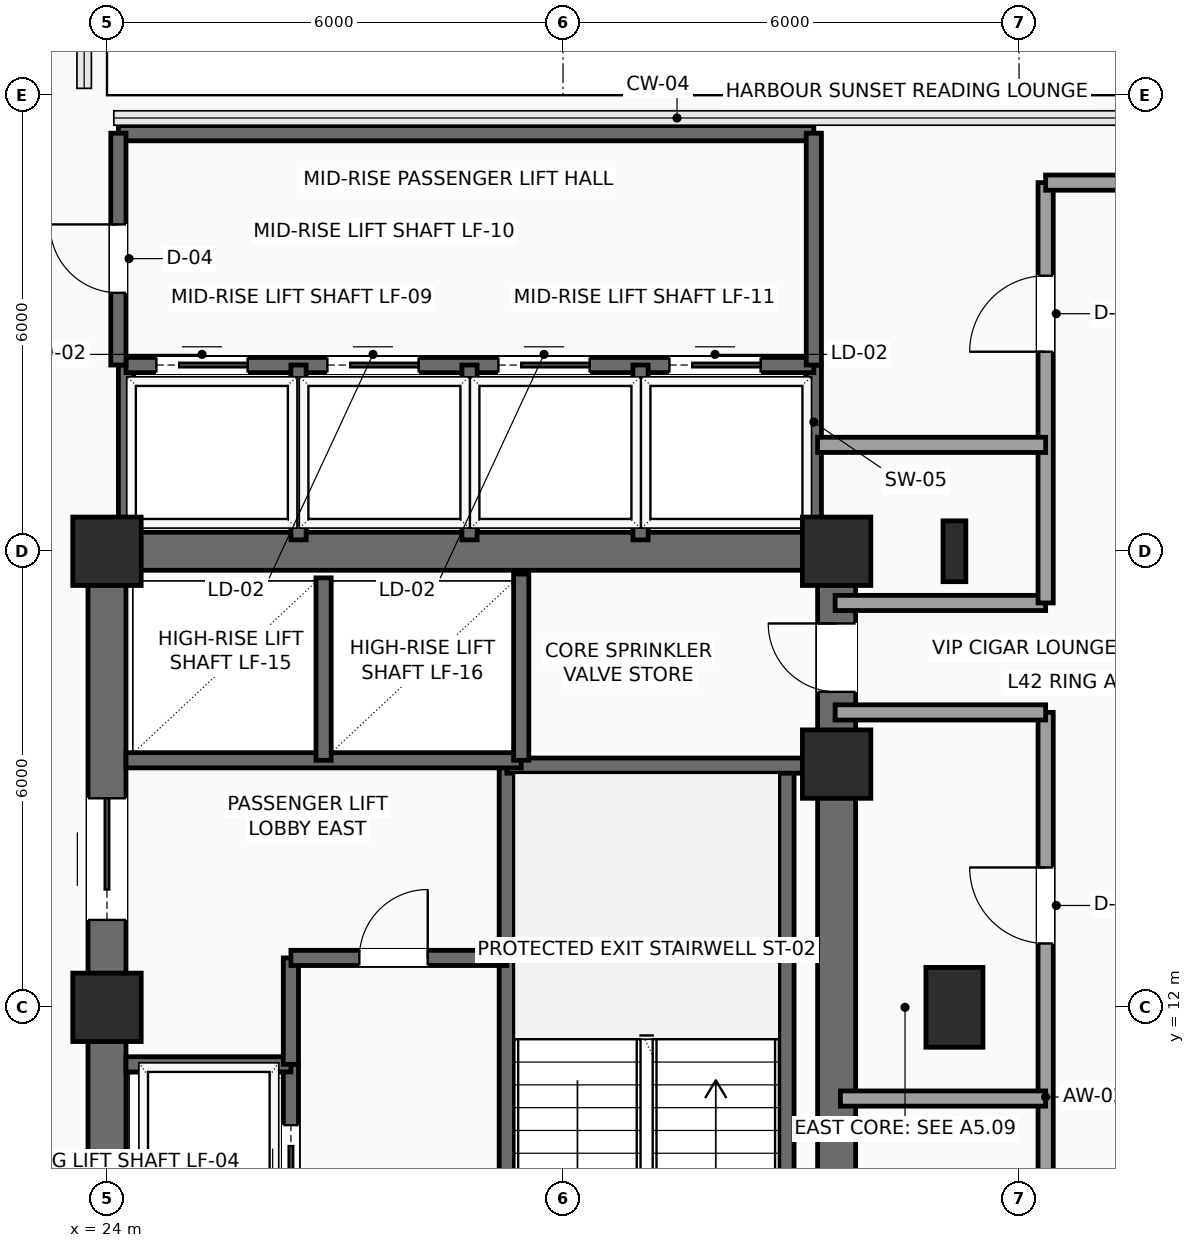
"""IFC4 building model, lengths in metres.
Left out: names, types, materials, properties, quantities, classifications, styles, units other than length and angle.
Written with IfcOpenShell. Run it as: python <this file> out.ifc"""

import sys

from ifc_helpers import new_model, si_unit, direction, frame, frame_2d, origin, origin_2d, place, context, subcontext, project, spatial, rectangle, i_section, extrude, element, fill, save


model = new_model("IFC4")
c1 = context("Model", 3, precision=1e-05, world=origin(), true_north=direction((0.0, 1.0)))
c2 = subcontext(c1, "Body", "Model", "MODEL_VIEW")
j1 = project(units=[si_unit("LENGTHUNIT", "METRE"), si_unit("PLANEANGLEUNIT", "RADIAN")], contexts=[c1])
p1 = place(None, origin())
s1 = spatial("IfcSite", under=j1, at=p1, CompositionType="ELEMENT")
p2 = place(p1, origin())
s2 = spatial("IfcBuilding", under=s1, at=p2, CompositionType="ELEMENT")
p3 = place(p2, frame((0.0, 0.0, 172.95)))
s3 = spatial("IfcBuildingStorey", under=s2, at=p3, CompositionType="ELEMENT", Elevation=172.95)
for number, where, z_axis, x_axis in (
    (1, (24.0, 12.0, 0.0), (0.0, 0.0, 1.0), (1.0, 0.0, 0.0)),
    (2, (24.0, 18.0, 0.0), (0.0, 0.0, 1.0), (1.0, 0.0, 0.0)),
    (3, (33.6, 15.2, 0.0), (0.0, 0.0, 1.0), (1.0, 0.0, 0.0)),
    (4, (33.6, 18.0, 0.0), (0.0, 0.0, 1.0), (1.0, 0.0, 0.0)),
):
    element("IfcColumn", number, at=place(p3, frame(where, z_axis=z_axis, x_axis=x_axis)), inside=s3, PredefinedType="COLUMN", context=c2, shape_type="SweptSolid", body=[
        extrude(rectangle(XDim=0.9, YDim=0.9, at=origin_2d()), origin(), (0.0, 0.0, 1.0), 3.75),
    ])
p4 = place(p3, frame((35.15, 12.0, 0.0), z_axis=(0.0, 0.0, 1.0), x_axis=(1.0, 0.0, 0.0)))
e5 = element("IfcColumn", 5, at=p4, inside=s3, PredefinedType="COLUMN", context=c2, shape_type="SweptSolid", body=[
    extrude(rectangle(XDim=0.75, YDim=1.05, at=origin_2d()), origin(), (0.0, 0.0, 1.0), 3.75),
])
p5 = place(p3, frame((35.15, 18.0, 0.0), z_axis=(0.0, 0.0, 1.0), x_axis=(1.0, 0.0, 0.0)))
e6 = element("IfcColumn", 6, at=p5, inside=s3, PredefinedType="COLUMN", context=c2, shape_type="SweptSolid", body=[
    extrude(i_section(OverallWidth=0.3, OverallDepth=0.8, WebThickness=0.018, FlangeThickness=0.033, FilletRadius=0.03, at=origin_2d()), origin(), (0.0, 0.0, 1.0), 3.75),
])
p6 = place(p3, frame((24.0, 18.0, 0.0), z_axis=(0.0, 0.0, 1.0), x_axis=(1.0, 0.0, 0.0)))
e7 = element("IfcWall", 7, at=p6, inside=s3, PredefinedType="SHEAR", context=c2, shape_type="SweptSolid", body=[
    extrude(rectangle(XDim=9.6, YDim=0.5, at=frame_2d((4.8, 0.0))), origin(), (0.0, 0.0, 1.0), 3.54),
])
p7 = place(p3, frame((24.0, 6.0, 0.0), z_axis=(0.0, 0.0, 1.0), x_axis=(0.0, 1.0, 0.0)))
e8 = element("IfcWall", 8, at=p7, inside=s3, PredefinedType="SHEAR", context=c2, shape_type="SweptSolid", body=[
    extrude(rectangle(XDim=12.0, YDim=0.5, at=frame_2d((6.0, 0.0))), origin(), (0.0, 0.0, 1.0), 3.54),
])
p8 = place(p7, frame((7.15, 0.0, 0.0)))
e9 = element("IfcOpeningElement", 9, at=p8, cuts=e8, PredefinedType="OPENING", context=c2, shape_type="SweptSolid", body=[
    extrude(rectangle(XDim=1.6, YDim=2.3, at=frame_2d((0.8, 1.15))), frame((0.0, 0.26, 0.0), z_axis=(0.0, -1.0, 0.0), x_axis=(1.0, 0.0, 0.0)), (0.0, 0.0, 1.0), 0.52),
])
p9 = place(p3, frame((33.6, 6.0, 0.0), z_axis=(0.0, 0.0, 1.0), x_axis=(0.0, 1.0, 0.0)))
e10 = element("IfcWall", 10, at=p9, inside=s3, PredefinedType="SHEAR", context=c2, shape_type="SweptSolid", body=[
    extrude(rectangle(XDim=12.0, YDim=0.5, at=frame_2d((6.0, 0.0))), origin(), (0.0, 0.0, 1.0), 3.54),
])
p10 = place(p9, frame((10.15, 0.0, 0.0)))
e11 = element("IfcOpeningElement", 11, at=p10, cuts=e10, PredefinedType="OPENING", context=c2, shape_type="SweptSolid", body=[
    extrude(rectangle(XDim=0.9, YDim=2.15, at=frame_2d((0.45, 1.075))), frame((0.0, 0.26, 0.0), z_axis=(0.0, -1.0, 0.0), x_axis=(1.0, 0.0, 0.0)), (0.0, 0.0, 1.0), 0.52),
])
p11 = place(p3, frame((29.26, 6.3, 0.0), z_axis=(0.0, 0.0, 1.0), x_axis=(0.0, 1.0, 0.0)))
e12 = element("IfcWall", 12, at=p11, inside=s3, PredefinedType="SHEAR", context=c2, shape_type="SweptSolid", body=[
    extrude(rectangle(XDim=8.88, YDim=0.2, at=frame_2d((4.44, 0.0))), origin(), (0.0, 0.0, 1.0), 3.54),
])
p12 = place(p11, frame((0.35, 0.0, 0.0)))
e13 = element("IfcOpeningElement", 13, at=p12, cuts=e12, PredefinedType="OPENING", context=c2, shape_type="SweptSolid", body=[
    extrude(rectangle(XDim=1.1, YDim=2.2, at=frame_2d((0.55, 1.1))), frame((0.0, 0.11, 0.0), z_axis=(0.0, -1.0, 0.0), x_axis=(1.0, 0.0, 0.0)), (0.0, 0.0, 1.0), 0.22),
])
p13 = place(p3, frame((32.94, 6.3, 0.0), z_axis=(0.0, 0.0, 1.0), x_axis=(0.0, 1.0, 0.0)))
e14 = element("IfcWall", 14, at=p13, inside=s3, PredefinedType="SHEAR", context=c2, shape_type="SweptSolid", body=[
    extrude(rectangle(XDim=8.88, YDim=0.2, at=frame_2d((4.44, 0.0))), origin(), (0.0, 0.0, 1.0), 3.54),
])
p14 = place(p3, frame((29.26, 15.18, 0.0), z_axis=(0.0, 0.0, 1.0), x_axis=(1.0, 0.0, 0.0)))
e15 = element("IfcWall", 15, at=p14, inside=s3, PredefinedType="SHEAR", context=c2, shape_type="SweptSolid", body=[
    extrude(rectangle(XDim=4.04, YDim=0.2, at=frame_2d((2.02, 0.0))), origin(), (0.0, 0.0, 1.0), 3.54),
])
p15 = place(p3, frame((26.42, 6.3, 0.0), z_axis=(0.0, 0.0, 1.0), x_axis=(0.0, 1.0, 0.0)))
e16 = element("IfcWall", 16, at=p15, inside=s3, PredefinedType="SHEAR", context=c2, shape_type="SweptSolid", body=[
    extrude(rectangle(XDim=4.95, YDim=0.2, at=frame_2d((2.475, 0.0))), origin(), (0.0, 0.0, 1.0), 3.54),
])
p16 = place(p15, frame((0.65, 0.0, 0.0)))
e17 = element("IfcOpeningElement", 17, at=p16, cuts=e16, PredefinedType="OPENING", context=c2, shape_type="SweptSolid", body=[
    extrude(rectangle(XDim=1.1, YDim=2.2, at=frame_2d((0.55, 1.1))), frame((0.0, 0.11, 0.0), z_axis=(0.0, -1.0, 0.0), x_axis=(1.0, 0.0, 0.0)), (0.0, 0.0, 1.0), 0.22),
])
p17 = place(p15, frame((3.05, 0.0, 0.0)))
e18 = element("IfcOpeningElement", 18, at=p17, cuts=e16, PredefinedType="OPENING", context=c2, shape_type="SweptSolid", body=[
    extrude(rectangle(XDim=1.1, YDim=2.2, at=frame_2d((0.55, 1.1))), frame((0.0, 0.11, 0.0), z_axis=(0.0, -1.0, 0.0), x_axis=(1.0, 0.0, 0.0)), (0.0, 0.0, 1.0), 0.22),
])
p18 = place(p3, frame((24.25, 11.25, 0.0), z_axis=(0.0, 0.0, 1.0), x_axis=(1.0, 0.0, 0.0)))
e19 = element("IfcWall", 19, at=p18, inside=s3, PredefinedType="SHEAR", context=c2, shape_type="SweptSolid", body=[
    extrude(rectangle(XDim=2.17, YDim=0.2, at=frame_2d((1.085, 0.0))), origin(), (0.0, 0.0, 1.0), 3.54),
])
p19 = place(p3, frame((26.42, 11.25, 0.0), z_axis=(0.0, 0.0, 1.0), x_axis=(0.0, 1.0, 0.0)))
e20 = element("IfcWall", 20, at=p19, inside=s3, PredefinedType="SHEAR", context=c2, shape_type="SweptSolid", body=[
    extrude(rectangle(XDim=1.4, YDim=0.2, at=frame_2d((0.7, 0.0))), origin(), (0.0, 0.0, 1.0), 3.54),
])
p20 = place(p3, frame((26.42, 12.65, 0.0), z_axis=(0.0, 0.0, 1.0), x_axis=(1.0, 0.0, 0.0)))
e21 = element("IfcWall", 21, at=p20, inside=s3, PredefinedType="SHEAR", context=c2, shape_type="SweptSolid", body=[
    extrude(rectangle(XDim=2.84, YDim=0.2, at=frame_2d((1.42, 0.0))), origin(), (0.0, 0.0, 1.0), 3.54),
])
p21 = place(p20, frame((0.9, 0.0, 0.0)))
e22 = element("IfcOpeningElement", 22, at=p21, cuts=e21, PredefinedType="OPENING", context=c2, shape_type="SweptSolid", body=[
    extrude(rectangle(XDim=0.9, YDim=2.15, at=frame_2d((0.45, 1.075))), frame((0.0, 0.11, 0.0), z_axis=(0.0, -1.0, 0.0), x_axis=(1.0, 0.0, 0.0)), (0.0, 0.0, 1.0), 0.22),
])
p22 = place(p3, frame((24.25, 15.25, 0.0), z_axis=(0.0, 0.0, 1.0), x_axis=(1.0, 0.0, 0.0)))
e23 = element("IfcWall", 23, at=p22, inside=s3, PredefinedType="SHEAR", context=c2, shape_type="SweptSolid", body=[
    extrude(rectangle(XDim=5.2, YDim=0.2, at=frame_2d((2.6, 0.0))), origin(), (0.0, 0.0, 1.0), 3.54),
])
p23 = place(p3, frame((26.85, 15.25, 0.0), z_axis=(0.0, 0.0, 1.0), x_axis=(0.0, 1.0, 0.0)))
e24 = element("IfcWall", 24, at=p23, inside=s3, PredefinedType="SHEAR", context=c2, shape_type="SweptSolid", body=[
    extrude(rectangle(XDim=2.4, YDim=0.2, at=frame_2d((1.2, 0.0))), origin(), (0.0, 0.0, 1.0), 3.54),
])
p24 = place(p3, frame((29.45, 15.25, 0.0), z_axis=(0.0, 0.0, 1.0), x_axis=(0.0, 1.0, 0.0)))
e25 = element("IfcWall", 25, at=p24, inside=s3, PredefinedType="SHEAR", context=c2, shape_type="SweptSolid", body=[
    extrude(rectangle(XDim=2.45, YDim=0.2, at=frame_2d((1.225, 0.0))), origin(), (0.0, 0.0, 1.0), 3.54),
])
for number, where, z_axis, x_axis in (
    (26, (33.3, 18.1, 0.0), (0.0, 0.0, 1.0), (0.0, 1.0, 0.0)),
    (27, (24.25, 18.1, 0.0), (0.0, 0.0, 1.0), (0.0, 1.0, 0.0)),
):
    element("IfcWall", number, at=place(p3, frame(where, z_axis=z_axis, x_axis=x_axis)), inside=s3, PredefinedType="SHEAR", context=c2, shape_type="SweptSolid", body=[
        extrude(rectangle(XDim=2.35, YDim=0.2, at=frame_2d((1.175, 0.0))), origin(), (0.0, 0.0, 1.0), 3.54),
    ])
p25 = place(p3, frame((24.25, 20.45, 0.0), z_axis=(0.0, 0.0, 1.0), x_axis=(1.0, 0.0, 0.0)))
e28 = element("IfcWall", 28, at=p25, inside=s3, PredefinedType="SHEAR", context=c2, shape_type="SweptSolid", body=[
    extrude(rectangle(XDim=9.05, YDim=0.2, at=frame_2d((4.525, 0.0))), origin(), (0.0, 0.0, 1.0), 3.54),
])
p26 = place(p25, frame((0.4, 0.0, 0.0)))
e29 = element("IfcOpeningElement", 29, at=p26, cuts=e28, PredefinedType="OPENING", context=c2, shape_type="SweptSolid", body=[
    extrude(rectangle(XDim=1.2, YDim=2.2, at=frame_2d((0.6, 1.1))), frame((0.0, 0.11, 0.0), z_axis=(0.0, -1.0, 0.0), x_axis=(1.0, 0.0, 0.0)), (0.0, 0.0, 1.0), 0.22),
])
p27 = place(p25, frame((2.65, 0.0, 0.0)))
e30 = element("IfcOpeningElement", 30, at=p27, cuts=e28, PredefinedType="OPENING", context=c2, shape_type="SweptSolid", body=[
    extrude(rectangle(XDim=1.2, YDim=2.2, at=frame_2d((0.6, 1.1))), frame((0.0, 0.11, 0.0), z_axis=(0.0, -1.0, 0.0), x_axis=(1.0, 0.0, 0.0)), (0.0, 0.0, 1.0), 0.22),
])
p28 = place(p25, frame((4.9, 0.0, 0.0)))
e31 = element("IfcOpeningElement", 31, at=p28, cuts=e28, PredefinedType="OPENING", context=c2, shape_type="SweptSolid", body=[
    extrude(rectangle(XDim=1.2, YDim=2.2, at=frame_2d((0.6, 1.1))), frame((0.0, 0.11, 0.0), z_axis=(0.0, -1.0, 0.0), x_axis=(1.0, 0.0, 0.0)), (0.0, 0.0, 1.0), 0.22),
])
p29 = place(p25, frame((7.15, 0.0, 0.0)))
e32 = element("IfcOpeningElement", 32, at=p29, cuts=e28, PredefinedType="OPENING", context=c2, shape_type="SweptSolid", body=[
    extrude(rectangle(XDim=1.2, YDim=2.2, at=frame_2d((0.6, 1.1))), frame((0.0, 0.11, 0.0), z_axis=(0.0, -1.0, 0.0), x_axis=(1.0, 0.0, 0.0)), (0.0, 0.0, 1.0), 0.22),
])
for number, where, z_axis, x_axis in (
    (33, (26.52, 18.15, 0.0), (0.0, 0.0, 1.0), (0.0, 1.0, 0.0)),
    (34, (28.77, 18.15, 0.0), (0.0, 0.0, 1.0), (0.0, 1.0, 0.0)),
    (35, (31.02, 18.15, 0.0), (0.0, 0.0, 1.0), (0.0, 1.0, 0.0)),
):
    element("IfcWall", number, at=place(p3, frame(where, z_axis=z_axis, x_axis=x_axis)), inside=s3, PredefinedType="SHEAR", context=c2, shape_type="SweptSolid", body=[
        extrude(rectangle(XDim=2.3, YDim=0.2, at=frame_2d((1.15, 0.0))), origin(), (0.0, 0.0, 1.0), 3.54),
    ])
p30 = place(p3, frame((24.15, 23.5, 0.0), z_axis=(0.0, 0.0, 1.0), x_axis=(1.0, 0.0, 0.0)))
e36 = element("IfcWall", 36, at=p30, inside=s3, PredefinedType="SHEAR", context=c2, shape_type="SweptSolid", body=[
    extrude(rectangle(XDim=9.15, YDim=0.2, at=frame_2d((4.575, 0.0))), origin(), (0.0, 0.0, 1.0), 3.54),
])
p31 = place(p3, frame((33.3, 20.45, 0.0), z_axis=(0.0, 0.0, 1.0), x_axis=(0.0, 1.0, 0.0)))
e37 = element("IfcWall", 37, at=p31, inside=s3, PredefinedType="SHEAR", context=c2, shape_type="SweptSolid", body=[
    extrude(rectangle(XDim=3.05, YDim=0.2, at=frame_2d((1.525, 0.0))), origin(), (0.0, 0.0, 1.0), 3.54),
])
p32 = place(p3, frame((24.15, 20.45, 0.0), z_axis=(0.0, 0.0, 1.0), x_axis=(0.0, 1.0, 0.0)))
e38 = element("IfcWall", 38, at=p32, inside=s3, PredefinedType="SHEAR", context=c2, shape_type="SweptSolid", body=[
    extrude(rectangle(XDim=3.05, YDim=0.2, at=frame_2d((1.525, 0.0))), origin(), (0.0, 0.0, 1.0), 3.54),
])
p33 = place(p32, frame((0.95, 0.0, 0.0)))
e39 = element("IfcOpeningElement", 39, at=p33, cuts=e38, PredefinedType="OPENING", context=c2, shape_type="SweptSolid", body=[
    extrude(rectangle(XDim=0.9, YDim=2.15, at=frame_2d((0.45, 1.075))), frame((0.0, 0.11, 0.0), z_axis=(0.0, -1.0, 0.0), x_axis=(1.0, 0.0, 0.0)), (0.0, 0.0, 1.0), 0.22),
])
p34 = place(p3, frame((36.35, 5.8, 0.0), z_axis=(0.0, 0.0, 1.0), x_axis=(0.0, 1.0, 0.0)))
e40 = element("IfcWall", 40, at=p34, inside=s3, PredefinedType="PARTITIONING", context=c2, shape_type="SweptSolid", body=[
    extrude(rectangle(XDim=10.08, YDim=0.2, at=frame_2d((5.04, 0.0))), origin(), (0.0, 0.0, 1.0), 3.54),
])
p35 = place(p34, frame((2.0, 0.0, 0.0)))
e41 = element("IfcOpeningElement", 41, at=p35, cuts=e40, PredefinedType="OPENING", context=c2, shape_type="SweptSolid", body=[
    extrude(rectangle(XDim=1.0, YDim=2.2, at=frame_2d((0.5, 1.1))), frame((0.0, 0.11, 0.0), z_axis=(0.0, -1.0, 0.0), x_axis=(1.0, 0.0, 0.0)), (0.0, 0.0, 1.0), 0.22),
])
p36 = place(p34, frame((7.04, 0.0, 0.0)))
e42 = element("IfcOpeningElement", 42, at=p36, cuts=e40, PredefinedType="OPENING", context=c2, shape_type="SweptSolid", body=[
    extrude(rectangle(XDim=1.0, YDim=2.2, at=frame_2d((0.5, 1.1))), frame((0.0, 0.11, 0.0), z_axis=(0.0, -1.0, 0.0), x_axis=(1.0, 0.0, 0.0)), (0.0, 0.0, 1.0), 0.22),
])
for number, where, z_axis, x_axis in (
    (43, (36.35, 15.88, 0.0), (0.0, 0.0, 1.0), (-1.0, 0.0, 0.0)),
    (44, (33.58, 17.32, 0.0), (0.0, 0.0, 1.0), (1.0, 0.0, 0.0)),
):
    element("IfcWall", number, at=place(p3, frame(where, z_axis=z_axis, x_axis=x_axis)), inside=s3, PredefinedType="PARTITIONING", context=c2, shape_type="SweptSolid", body=[
        extrude(rectangle(XDim=2.77, YDim=0.2, at=frame_2d((1.385, 0.0))), origin(), (0.0, 0.0, 1.0), 3.54),
    ])
p37 = place(p3, frame((36.35, 17.32, 0.0), z_axis=(0.0, 0.0, 1.0), x_axis=(0.0, 1.0, 0.0)))
e45 = element("IfcWall", 45, at=p37, inside=s3, PredefinedType="PARTITIONING", context=c2, shape_type="SweptSolid", body=[
    extrude(rectangle(XDim=5.53, YDim=0.2, at=frame_2d((2.765, 0.0))), origin(), (0.0, 0.0, 1.0), 3.54),
])
p38 = place(p37, frame((3.305, 0.0, 0.0)))
e46 = element("IfcOpeningElement", 46, at=p38, cuts=e45, PredefinedType="OPENING", context=c2, shape_type="SweptSolid", body=[
    extrude(rectangle(XDim=1.0, YDim=2.2, at=frame_2d((0.5, 1.1))), frame((0.0, 0.11, 0.0), z_axis=(0.0, -1.0, 0.0), x_axis=(1.0, 0.0, 0.0)), (0.0, 0.0, 1.0), 0.22),
])
p39 = place(p3, frame((36.35, 22.85, 0.0), z_axis=(0.0, 0.0, 1.0), x_axis=(1.0, 0.0, 0.0)))
e47 = element("IfcWall", 47, at=p39, inside=s3, PredefinedType="PARTITIONING", context=c2, shape_type="SweptSolid", body=[
    extrude(rectangle(XDim=2.1, YDim=0.2, at=frame_2d((1.05, 0.0))), origin(), (0.0, 0.0, 1.0), 3.54),
])
p40 = place(p3, frame((33.65, 10.8, 0.0), z_axis=(0.0, 0.0, 1.0), x_axis=(1.0, 0.0, 0.0)))
e48 = element("IfcWall", 48, at=p40, inside=s3, PredefinedType="PARTITIONING", context=c2, shape_type="SweptSolid", body=[
    extrude(rectangle(XDim=2.7, YDim=0.2, at=frame_2d((1.35, 0.0))), origin(), (0.0, 0.0, 1.0), 3.54),
])
p41 = place(p3, frame((33.35, 19.4, 0.0), z_axis=(0.0, 0.0, 1.0), x_axis=(1.0, 0.0, 0.0)))
e49 = element("IfcWall", 49, at=p41, inside=s3, PredefinedType="PARTITIONING", context=c2, shape_type="SweptSolid", body=[
    extrude(rectangle(XDim=3.0, YDim=0.2, at=frame_2d((1.5, 0.0))), origin(), (0.0, 0.0, 1.0), 3.54),
])
p42 = place(p8, origin())
e50 = element("IfcDoor", 50, at=p42, inside=s3, OperationType="DOUBLE_DOOR_SLIDING", PredefinedType="DOOR", context=c2, shape_type="SweptSolid", body=[
    extrude(rectangle(XDim=1.6, YDim=2.3, at=frame_2d((0.8, 1.15))), frame((0.0, 0.025, 0.0), z_axis=(0.0, -1.0, 0.0), x_axis=(1.0, 0.0, 0.0)), (0.0, 0.0, 1.0), 0.05),
])
fill(e9, e50)
p43 = place(p10, origin())
e51 = element("IfcDoor", 51, at=p43, inside=s3, OperationType="SINGLE_SWING_RIGHT", PredefinedType="DOOR", context=c2, shape_type="SweptSolid", body=[
    extrude(rectangle(XDim=0.9, YDim=2.15, at=frame_2d((0.45, 1.075))), frame((0.0, 0.025, 0.0), z_axis=(0.0, -1.0, 0.0), x_axis=(1.0, 0.0, 0.0)), (0.0, 0.0, 1.0), 0.05),
])
fill(e11, e51)
p44 = place(p17, origin())
e52 = element("IfcDoor", 52, at=p44, inside=s3, OperationType="SLIDING_TO_LEFT", PredefinedType="DOOR", context=c2, shape_type="SweptSolid", body=[
    extrude(rectangle(XDim=1.1, YDim=2.2, at=frame_2d((0.55, 1.1))), frame((0.0, 0.025, 0.0), z_axis=(0.0, -1.0, 0.0), x_axis=(1.0, 0.0, 0.0)), (0.0, 0.0, 1.0), 0.05),
])
fill(e18, e52)
p45 = place(p21, origin())
e53 = element("IfcDoor", 53, at=p45, inside=s3, OperationType="SINGLE_SWING_RIGHT", PredefinedType="DOOR", context=c2, shape_type="SweptSolid", body=[
    extrude(rectangle(XDim=0.9, YDim=2.15, at=frame_2d((0.45, 1.075))), frame((0.0, 0.025, 0.0), z_axis=(0.0, -1.0, 0.0), x_axis=(1.0, 0.0, 0.0)), (0.0, 0.0, 1.0), 0.05),
])
fill(e22, e53)
p46 = place(p26, origin())
e54 = element("IfcDoor", 54, at=p46, inside=s3, OperationType="SLIDING_TO_RIGHT", PredefinedType="DOOR", context=c2, shape_type="SweptSolid", body=[
    extrude(rectangle(XDim=1.2, YDim=2.2, at=frame_2d((0.6, 1.1))), frame((0.0, 0.025, 0.0), z_axis=(0.0, -1.0, 0.0), x_axis=(1.0, 0.0, 0.0)), (0.0, 0.0, 1.0), 0.05),
])
fill(e29, e54)
p47 = place(p27, origin())
e55 = element("IfcDoor", 55, at=p47, inside=s3, OperationType="SLIDING_TO_RIGHT", PredefinedType="DOOR", context=c2, shape_type="SweptSolid", body=[
    extrude(rectangle(XDim=1.2, YDim=2.2, at=frame_2d((0.6, 1.1))), frame((0.0, 0.025, 0.0), z_axis=(0.0, -1.0, 0.0), x_axis=(1.0, 0.0, 0.0)), (0.0, 0.0, 1.0), 0.05),
])
fill(e30, e55)
p48 = place(p28, origin())
e56 = element("IfcDoor", 56, at=p48, inside=s3, OperationType="SLIDING_TO_RIGHT", PredefinedType="DOOR", context=c2, shape_type="SweptSolid", body=[
    extrude(rectangle(XDim=1.2, YDim=2.2, at=frame_2d((0.6, 1.1))), frame((0.0, 0.025, 0.0), z_axis=(0.0, -1.0, 0.0), x_axis=(1.0, 0.0, 0.0)), (0.0, 0.0, 1.0), 0.05),
])
fill(e31, e56)
p49 = place(p29, origin())
e57 = element("IfcDoor", 57, at=p49, inside=s3, OperationType="SLIDING_TO_RIGHT", PredefinedType="DOOR", context=c2, shape_type="SweptSolid", body=[
    extrude(rectangle(XDim=1.2, YDim=2.2, at=frame_2d((0.6, 1.1))), frame((0.0, 0.025, 0.0), z_axis=(0.0, -1.0, 0.0), x_axis=(1.0, 0.0, 0.0)), (0.0, 0.0, 1.0), 0.05),
])
fill(e32, e57)
p50 = place(p33, origin())
e58 = element("IfcDoor", 58, at=p50, inside=s3, OperationType="SINGLE_SWING_RIGHT", PredefinedType="DOOR", context=c2, shape_type="SweptSolid", body=[
    extrude(rectangle(XDim=0.9, YDim=2.15, at=frame_2d((0.45, 1.075))), frame((0.0, 0.025, 0.0), z_axis=(0.0, -1.0, 0.0), x_axis=(1.0, 0.0, 0.0)), (0.0, 0.0, 1.0), 0.05),
])
fill(e39, e58)
p51 = place(p36, origin())
e59 = element("IfcDoor", 59, at=p51, inside=s3, OperationType="SINGLE_SWING_RIGHT", PredefinedType="DOOR", context=c2, shape_type="SweptSolid", body=[
    extrude(rectangle(XDim=1.0, YDim=2.2, at=frame_2d((0.5, 1.1))), frame((0.0, 0.025, 0.0), z_axis=(0.0, -1.0, 0.0), x_axis=(1.0, 0.0, 0.0)), (0.0, 0.0, 1.0), 0.05),
])
fill(e42, e59)
p52 = place(p38, origin())
e60 = element("IfcDoor", 60, at=p52, inside=s3, OperationType="SINGLE_SWING_LEFT", PredefinedType="DOOR", context=c2, shape_type="SweptSolid", body=[
    extrude(rectangle(XDim=1.0, YDim=2.2, at=frame_2d((0.5, 1.1))), frame((0.0, 0.025, 0.0), z_axis=(0.0, -1.0, 0.0), x_axis=(1.0, 0.0, 0.0)), (0.0, 0.0, 1.0), 0.05),
])
fill(e46, e60)
save(model, sys.argv[1])
